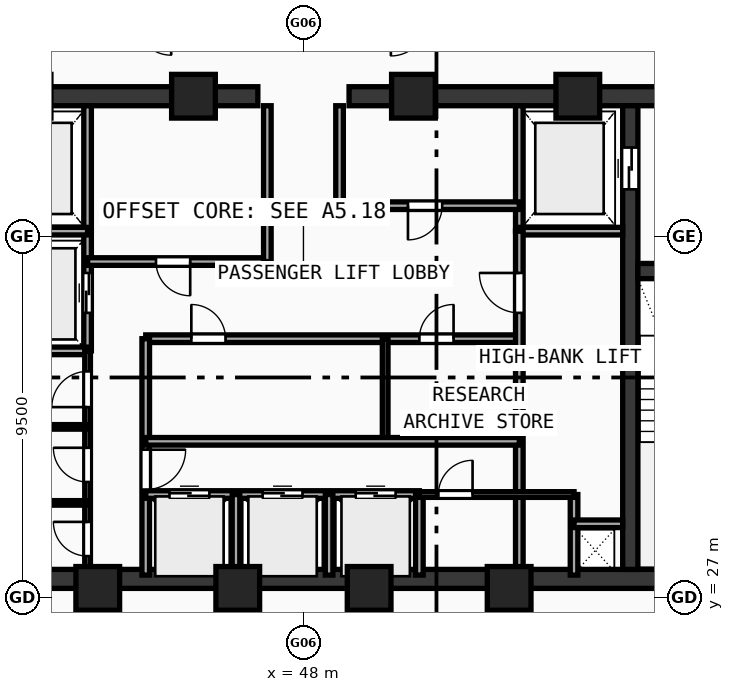
"""IFC4 building model, lengths in metres.
Left out: names, types, materials, properties, quantities, classifications, styles, units other than length and angle.
Written with IfcOpenShell. Run it as: python <this file> out.ifc"""

import sys

from ifc_helpers import new_model, si_unit, direction, frame, frame_2d, origin, origin_with_axes, origin_2d, place, context, subcontext, project, spatial, rectangle, hollow_rectangle, extrude, source, transform, mapped, element, fill, save


model = new_model("IFC4")
c1 = context("Model", 3, precision=1e-05, world=origin(), true_north=direction((0.0, 1.0)))
c2 = subcontext(c1, "Body", "Model", "MODEL_VIEW")
j1 = project(units=[si_unit("LENGTHUNIT", "METRE"), si_unit("PLANEANGLEUNIT", "RADIAN")], contexts=[c1])
p1 = place(None, origin())
s1 = spatial("IfcSite", under=j1, at=p1, CompositionType="ELEMENT")
p2 = place(p1, origin())
s2 = spatial("IfcBuilding", under=s1, at=p2, CompositionType="ELEMENT")
p3 = place(p2, frame((0.0, 0.0, 277.56)))
s3 = spatial("IfcBuildingStorey", under=s2, at=p3, CompositionType="ELEMENT", Elevation=277.56)
p4 = place(p3, frame((35.55, 27.5, 0.0), z_axis=(0.0, 0.0, 1.0), x_axis=(1.0, 0.0, 0.0)))
e1 = element("IfcWall", 1, at=p4, inside=s3, PredefinedType="SHEAR", context=c2, shape_type="SweptSolid", body=[
    extrude(rectangle(XDim=24.9, YDim=0.5, at=frame_2d((12.45, 0.0))), origin(), (0.0, 0.0, 1.0), 3.47),
])
p5 = place(p3, frame((35.55, 40.2, 0.0), z_axis=(0.0, 0.0, 1.0), x_axis=(1.0, 0.0, 0.0)))
e2 = element("IfcWall", 2, at=p5, inside=s3, PredefinedType="SHEAR", context=c2, shape_type="SweptSolid", body=[
    extrude(rectangle(XDim=11.25, YDim=0.5, at=frame_2d((5.625, 0.0))), origin(), (0.0, 0.0, 1.0), 3.47),
])
p6 = place(p5, frame((1.6, 0.0, 0.0)))
e3 = element("IfcOpeningElement", 3, at=p6, cuts=e2, PredefinedType="OPENING", context=c2, shape_type="SweptSolid", body=[
    extrude(rectangle(XDim=1.05, YDim=2.1, at=frame_2d((0.525, 1.05))), frame((0.0, 0.26, 0.0), z_axis=(0.0, -1.0, 0.0), x_axis=(1.0, 0.0, 0.0)), (0.0, 0.0, 1.0), 0.52),
])
p7 = place(p3, frame((49.2, 40.2, 0.0), z_axis=(0.0, 0.0, 1.0), x_axis=(1.0, 0.0, 0.0)))
e4 = element("IfcWall", 4, at=p7, inside=s3, PredefinedType="SHEAR", context=c2, shape_type="SweptSolid", body=[
    extrude(rectangle(XDim=11.25, YDim=0.5, at=frame_2d((5.625, 0.0))), origin(), (0.0, 0.0, 1.0), 3.47),
])
p8 = place(p7, frame((8.6, 0.0, 0.0)))
e5 = element("IfcOpeningElement", 5, at=p8, cuts=e4, PredefinedType="OPENING", context=c2, shape_type="SweptSolid", body=[
    extrude(rectangle(XDim=1.05, YDim=2.1, at=frame_2d((0.525, 1.05))), frame((0.0, 0.26, 0.0), z_axis=(0.0, -1.0, 0.0), x_axis=(1.0, 0.0, 0.0)), (0.0, 0.0, 1.0), 0.52),
])
p9 = place(p3, frame((56.6, 27.75, 0.0), z_axis=(0.0, 0.0, 1.0), x_axis=(0.0, 1.0, 0.0)))
e6 = element("IfcWall", 6, at=p9, inside=s3, PredefinedType="SHEAR", context=c2, shape_type="SweptSolid", body=[
    extrude(rectangle(XDim=12.2, YDim=0.4, at=frame_2d((6.1, 0.0))), origin(), (0.0, 0.0, 1.0), 3.47),
])
p10 = place(p9, frame((10.0, 0.0, 0.0)))
e7 = element("IfcOpeningElement", 7, at=p10, cuts=e6, PredefinedType="OPENING", context=c2, shape_type="SweptSolid", body=[
    extrude(rectangle(XDim=1.1, YDim=2.1, at=frame_2d((0.55, 1.05))), frame((0.0, 0.21, 0.0), z_axis=(0.0, -1.0, 0.0), x_axis=(1.0, 0.0, 0.0)), (0.0, 0.0, 1.0), 0.42),
])
p11 = place(p3, frame((56.8, 35.6, 0.0), z_axis=(0.0, 0.0, 1.0), x_axis=(1.0, 0.0, 0.0)))
e8 = element("IfcWall", 8, at=p11, inside=s3, PredefinedType="SHEAR", context=c2, shape_type="SweptSolid", body=[
    extrude(rectangle(XDim=3.15, YDim=0.4, at=frame_2d((1.575, 0.0))), origin(), (0.0, 0.0, 1.0), 3.47),
])
p12 = place(p11, frame((1.02, 0.0, 0.0)))
e9 = element("IfcOpeningElement", 9, at=p12, cuts=e8, PredefinedType="OPENING", context=c2, shape_type="SweptSolid", body=[
    extrude(rectangle(XDim=1.05, YDim=2.1, at=frame_2d((0.525, 1.05))), frame((0.0, 0.21, 0.0), z_axis=(0.0, -1.0, 0.0), x_axis=(1.0, 0.0, 0.0)), (0.0, 0.0, 1.0), 0.42),
])
m1 = source(origin(), c2, "Body", "SweptSolid", [
    extrude(hollow_rectangle(XDim=1.15, YDim=1.15, WallThickness=0.048, at=origin_2d()), origin(), (0.0, 0.0, 1.0), 3.73),
])
for number, where, z_axis, x_axis in (
    (10, (42.588, 27.25, -0.26), (0.0, 0.0, 1.0), (1.0, 0.0, 0.0)),
    (11, (46.272, 27.25, -0.26), (0.0, 0.0, 1.0), (1.0, 0.0, 0.0)),
    (12, (49.729, 27.25, -0.26), (0.0, 0.0, 1.0), (1.0, 0.0, 0.0)),
    (13, (53.412, 27.25, -0.26), (0.0, 0.0, 1.0), (1.0, 0.0, 0.0)),
    (14, (55.219, 40.2, -0.26), (0.0, 0.0, 1.0), (1.0, 0.0, 0.0)),
    (15, (50.894, 40.2, -0.26), (0.0, 0.0, 1.0), (1.0, 0.0, 0.0)),
    (16, (45.106, 40.2, -0.26), (0.0, 0.0, 1.0), (1.0, 0.0, 0.0)),
):
    element("IfcColumn", number, at=place(p3, frame(where, z_axis=z_axis, x_axis=x_axis)), inside=s3, PredefinedType="COLUMN", context=c2, shape_type="MappedRepresentation", body=[
        mapped(m1, transform((0.0, 0.0, 0.0), scale=1.0)),
    ])
p13 = place(p3, frame((42.32, 33.5, 0.0), z_axis=(0.0, 0.0, 1.0), x_axis=(0.0, 1.0, 0.0)))
e17 = element("IfcWall", 17, at=p13, inside=s3, PredefinedType="SOLIDWALL", context=c2, shape_type="SweptSolid", body=[
    extrude(rectangle(XDim=6.45, YDim=0.2, at=frame_2d((3.225, 0.0))), origin(), (0.0, 0.0, 1.0), 3.47),
])
p14 = place(p13, frame((1.0, 0.0, 0.0)))
e18 = element("IfcOpeningElement", 18, at=p14, cuts=e17, PredefinedType="OPENING", context=c2, shape_type="SweptSolid", body=[
    extrude(rectangle(XDim=1.05, YDim=2.1, at=frame_2d((0.525, 1.05))), frame((0.0, 0.11, 0.0), z_axis=(0.0, -1.0, 0.0), x_axis=(1.0, 0.0, 0.0)), (0.0, 0.0, 1.0), 0.22),
])
for number, where, z_axis, x_axis in (
    (19, (39.6, 36.65, 0.0), (0.0, 0.0, 1.0), (1.0, 0.0, 0.0)),
    (20, (39.6, 33.5, 0.0), (0.0, 0.0, 1.0), (1.0, 0.0, 0.0)),
):
    element("IfcWall", number, at=place(p3, frame(where, z_axis=z_axis, x_axis=x_axis)), inside=s3, PredefinedType="SOLIDWALL", context=c2, shape_type="SweptSolid", body=[
        extrude(rectangle(XDim=2.72, YDim=0.2, at=frame_2d((1.36, 0.0))), origin(), (0.0, 0.0, 1.0), 3.47),
    ])
p15 = place(p3, frame((53.68, 36.65, 0.0), z_axis=(0.0, 0.0, 1.0), x_axis=(0.0, 1.0, 0.0)))
e21 = element("IfcWall", 21, at=p15, inside=s3, PredefinedType="SOLIDWALL", context=c2, shape_type="SweptSolid", body=[
    extrude(rectangle(XDim=3.3, YDim=0.2, at=frame_2d((1.65, 0.0))), origin(), (0.0, 0.0, 1.0), 3.47),
])
p16 = place(p3, frame((53.68, 36.65, 0.0), z_axis=(0.0, 0.0, 1.0), x_axis=(1.0, 0.0, 0.0)))
e22 = element("IfcWall", 22, at=p16, inside=s3, PredefinedType="SOLIDWALL", context=c2, shape_type="SweptSolid", body=[
    extrude(rectangle(XDim=2.72, YDim=0.2, at=frame_2d((1.36, 0.0))), origin(), (0.0, 0.0, 1.0), 3.47),
])
p17 = place(p3, frame((42.32, 35.85, 0.0), z_axis=(0.0, 0.0, 1.0), x_axis=(1.0, 0.0, 0.0)))
e23 = element("IfcWall", 23, at=p17, inside=s3, PredefinedType="SOLIDWALL", context=c2, shape_type="SweptSolid", body=[
    extrude(rectangle(XDim=4.73, YDim=0.2, at=frame_2d((2.365, 0.0))), origin(), (0.0, 0.0, 1.0), 3.47),
])
p18 = place(p17, frame((1.8, 0.0, 0.0)))
e24 = element("IfcOpeningElement", 24, at=p18, cuts=e23, PredefinedType="OPENING", context=c2, shape_type="SweptSolid", body=[
    extrude(rectangle(XDim=0.9, YDim=2.1, at=frame_2d((0.45, 1.05))), frame((0.0, 0.11, 0.0), z_axis=(0.0, -1.0, 0.0), x_axis=(1.0, 0.0, 0.0)), (0.0, 0.0, 1.0), 0.22),
])
p19 = place(p3, frame((48.95, 37.32, 0.0), z_axis=(0.0, 0.0, 1.0), x_axis=(1.0, 0.0, 0.0)))
e25 = element("IfcWall", 25, at=p19, inside=s3, PredefinedType="SOLIDWALL", context=c2, shape_type="SweptSolid", body=[
    extrude(rectangle(XDim=4.73, YDim=0.2, at=frame_2d((2.365, 0.0))), origin(), (0.0, 0.0, 1.0), 3.47),
])
p20 = place(p19, frame((1.8, 0.0, 0.0)))
e26 = element("IfcOpeningElement", 26, at=p20, cuts=e25, PredefinedType="OPENING", context=c2, shape_type="SweptSolid", body=[
    extrude(rectangle(XDim=0.9, YDim=2.1, at=frame_2d((0.45, 1.05))), frame((0.0, 0.11, 0.0), z_axis=(0.0, -1.0, 0.0), x_axis=(1.0, 0.0, 0.0)), (0.0, 0.0, 1.0), 0.22),
])
p21 = place(p3, frame((47.05, 35.85, 0.0), z_axis=(0.0, 0.0, 1.0), x_axis=(0.0, 1.0, 0.0)))
e27 = element("IfcWall", 27, at=p21, inside=s3, PredefinedType="SOLIDWALL", context=c2, shape_type="SweptSolid", body=[
    extrude(rectangle(XDim=4.1, YDim=0.2, at=frame_2d((2.05, 0.0))), origin(), (0.0, 0.0, 1.0), 3.47),
])
p22 = place(p3, frame((48.95, 37.32, 0.0), z_axis=(0.0, 0.0, 1.0), x_axis=(0.0, 1.0, 0.0)))
e28 = element("IfcWall", 28, at=p22, inside=s3, PredefinedType="SOLIDWALL", context=c2, shape_type="SweptSolid", body=[
    extrude(rectangle(XDim=2.63, YDim=0.2, at=frame_2d((1.315, 0.0))), origin(), (0.0, 0.0, 1.0), 3.47),
])
p23 = place(p3, frame((43.85, 33.82, 0.0), z_axis=(0.0, 0.0, 1.0), x_axis=(1.0, 0.0, 0.0)))
e29 = element("IfcWall", 29, at=p23, inside=s3, PredefinedType="SOLIDWALL", context=c2, shape_type="SweptSolid", body=[
    extrude(rectangle(XDim=9.83, YDim=0.2, at=frame_2d((4.915, 0.0))), origin(), (0.0, 0.0, 1.0), 3.47),
])
p24 = place(p23, frame((1.2, 0.0, 0.0)))
e30 = element("IfcOpeningElement", 30, at=p24, cuts=e29, PredefinedType="OPENING", context=c2, shape_type="SweptSolid", body=[
    extrude(rectangle(XDim=0.9, YDim=2.1, at=frame_2d((0.45, 1.05))), frame((0.0, 0.11, 0.0), z_axis=(0.0, -1.0, 0.0), x_axis=(1.0, 0.0, 0.0)), (0.0, 0.0, 1.0), 0.22),
])
p25 = place(p23, frame((7.2, 0.0, 0.0)))
e31 = element("IfcOpeningElement", 31, at=p25, cuts=e29, PredefinedType="OPENING", context=c2, shape_type="SweptSolid", body=[
    extrude(rectangle(XDim=0.9, YDim=2.1, at=frame_2d((0.45, 1.05))), frame((0.0, 0.11, 0.0), z_axis=(0.0, -1.0, 0.0), x_axis=(1.0, 0.0, 0.0)), (0.0, 0.0, 1.0), 0.22),
])
p26 = place(p3, frame((43.85, 27.6, 0.0), z_axis=(0.0, 0.0, 1.0), x_axis=(0.0, 1.0, 0.0)))
e32 = element("IfcWall", 32, at=p26, inside=s3, PredefinedType="SOLIDWALL", context=c2, shape_type="SweptSolid", body=[
    extrude(rectangle(XDim=6.22, YDim=0.2, at=frame_2d((3.11, 0.0))), origin(), (0.0, 0.0, 1.0), 3.47),
])
p27 = place(p26, frame((2.25, 0.0, 0.0)))
e33 = element("IfcOpeningElement", 33, at=p27, cuts=e32, PredefinedType="OPENING", context=c2, shape_type="SweptSolid", body=[
    extrude(rectangle(XDim=1.05, YDim=2.1, at=frame_2d((0.525, 1.05))), frame((0.0, 0.11, 0.0), z_axis=(0.0, -1.0, 0.0), x_axis=(1.0, 0.0, 0.0)), (0.0, 0.0, 1.0), 0.22),
])
p28 = place(p3, frame((53.68, 27.6, 0.0), z_axis=(0.0, 0.0, 1.0), x_axis=(0.0, 1.0, 0.0)))
e34 = element("IfcWall", 34, at=p28, inside=s3, PredefinedType="SOLIDWALL", context=c2, shape_type="SweptSolid", body=[
    extrude(rectangle(XDim=9.05, YDim=0.2, at=frame_2d((4.525, 0.0))), origin(), (0.0, 0.0, 1.0), 3.47),
])
p29 = place(p28, frame((6.9, 0.0, 0.0)))
e35 = element("IfcOpeningElement", 35, at=p29, cuts=e34, PredefinedType="OPENING", context=c2, shape_type="SweptSolid", body=[
    extrude(rectangle(XDim=1.05, YDim=2.1, at=frame_2d((0.525, 1.05))), frame((0.0, 0.11, 0.0), z_axis=(0.0, -1.0, 0.0), x_axis=(1.0, 0.0, 0.0)), (0.0, 0.0, 1.0), 0.22),
])
p30 = place(p3, frame((50.15, 31.12, 0.0), z_axis=(0.0, 0.0, 1.0), x_axis=(0.0, 1.0, 0.0)))
e36 = element("IfcWall", 36, at=p30, inside=s3, PredefinedType="PARTITIONING", context=c2, shape_type="SweptSolid", body=[
    extrude(rectangle(XDim=2.7, YDim=0.15, at=frame_2d((1.35, 0.0))), origin(), (0.0, 0.0, 1.0), 3.47),
])
p31 = place(p3, frame((43.85, 29.72, 0.0), z_axis=(0.0, 0.0, 1.0), x_axis=(1.0, 0.0, 0.0)))
e37 = element("IfcWall", 37, at=p31, inside=s3, PredefinedType="SOLIDWALL", context=c2, shape_type="SweptSolid", body=[
    extrude(rectangle(XDim=7.2, YDim=0.2, at=frame_2d((3.6, 0.0))), origin(), (0.0, 0.0, 1.0), 3.47),
])
p32 = place(p31, frame((0.625, 0.0, 0.0)))
e38 = element("IfcOpeningElement", 38, at=p32, cuts=e37, PredefinedType="OPENING", context=c2, shape_type="SweptSolid", body=[
    extrude(rectangle(XDim=1.05, YDim=2.1, at=frame_2d((0.525, 1.05))), frame((0.0, 0.11, 0.0), z_axis=(0.0, -1.0, 0.0), x_axis=(1.0, 0.0, 0.0)), (0.0, 0.0, 1.0), 0.22),
])
p33 = place(p31, frame((3.075, 0.0, 0.0)))
e39 = element("IfcOpeningElement", 39, at=p33, cuts=e37, PredefinedType="OPENING", context=c2, shape_type="SweptSolid", body=[
    extrude(rectangle(XDim=1.05, YDim=2.1, at=frame_2d((0.525, 1.05))), frame((0.0, 0.11, 0.0), z_axis=(0.0, -1.0, 0.0), x_axis=(1.0, 0.0, 0.0)), (0.0, 0.0, 1.0), 0.22),
])
p34 = place(p31, frame((5.525, 0.0, 0.0)))
e40 = element("IfcOpeningElement", 40, at=p34, cuts=e37, PredefinedType="OPENING", context=c2, shape_type="SweptSolid", body=[
    extrude(rectangle(XDim=1.05, YDim=2.1, at=frame_2d((0.525, 1.05))), frame((0.0, 0.11, 0.0), z_axis=(0.0, -1.0, 0.0), x_axis=(1.0, 0.0, 0.0)), (0.0, 0.0, 1.0), 0.22),
])
p35 = place(p3, frame((51.05, 27.6, 0.0), z_axis=(0.0, 0.0, 1.0), x_axis=(0.0, 1.0, 0.0)))
e41 = element("IfcWall", 41, at=p35, inside=s3, PredefinedType="SOLIDWALL", context=c2, shape_type="SweptSolid", body=[
    extrude(rectangle(XDim=2.12, YDim=0.2, at=frame_2d((1.06, 0.0))), origin(), (0.0, 0.0, 1.0), 3.47),
])
p36 = place(p3, frame((43.85, 31.12, 0.0), z_axis=(0.0, 0.0, 1.0), x_axis=(1.0, 0.0, 0.0)))
e42 = element("IfcWall", 42, at=p36, inside=s3, PredefinedType="SOLIDWALL", context=c2, shape_type="SweptSolid", body=[
    extrude(rectangle(XDim=9.83, YDim=0.2, at=frame_2d((4.915, 0.0))), origin(), (0.0, 0.0, 1.0), 3.47),
])
for number, where, z_axis, x_axis in (
    (43, (46.225, 27.6, 0.0), (0.0, 0.0, 1.0), (0.0, 1.0, 0.0)),
    (44, (48.675, 27.6, 0.0), (0.0, 0.0, 1.0), (0.0, 1.0, 0.0)),
    (45, (55.12, 27.6, 0.0), (0.0, 0.0, 1.0), (0.0, 1.0, 0.0)),
):
    element("IfcWall", number, at=place(p3, frame(where, z_axis=z_axis, x_axis=x_axis)), inside=s3, PredefinedType="SOLIDWALL", context=c2, shape_type="SweptSolid", body=[
        extrude(rectangle(XDim=2.12, YDim=0.2, at=frame_2d((1.06, 0.0))), origin(), (0.0, 0.0, 1.0), 3.47),
    ])
p37 = place(p3, frame((55.12, 28.95, 0.0), z_axis=(0.0, 0.0, 1.0), x_axis=(1.0, 0.0, 0.0)))
e46 = element("IfcWall", 46, at=p37, inside=s3, PredefinedType="SOLIDWALL", context=c2, shape_type="SweptSolid", body=[
    extrude(rectangle(XDim=1.28, YDim=0.2, at=frame_2d((0.64, 0.0))), origin(), (0.0, 0.0, 1.0), 3.47),
])
p38 = place(p3, frame((42.32, 27.6, 0.0), z_axis=(0.0, 0.0, 1.0), x_axis=(0.0, 1.0, 0.0)))
e47 = element("IfcWall", 47, at=p38, inside=s3, PredefinedType="PARTITIONING", context=c2, shape_type="SweptSolid", body=[
    extrude(rectangle(XDim=5.9, YDim=0.15, at=frame_2d((2.95, 0.0))), origin(), (0.0, 0.0, 1.0), 3.47),
])
p39 = place(p38, frame((0.5, 0.0, 0.0)))
e48 = element("IfcOpeningElement", 48, at=p39, cuts=e47, PredefinedType="OPENING", context=c2, shape_type="SweptSolid", body=[
    extrude(rectangle(XDim=0.9, YDim=2.1, at=frame_2d((0.45, 1.05))), frame((0.0, 0.085, 0.0), z_axis=(0.0, -1.0, 0.0), x_axis=(1.0, 0.0, 0.0)), (0.0, 0.0, 1.0), 0.17),
])
p40 = place(p38, frame((2.45, 0.0, 0.0)))
e49 = element("IfcOpeningElement", 49, at=p40, cuts=e47, PredefinedType="OPENING", context=c2, shape_type="SweptSolid", body=[
    extrude(rectangle(XDim=0.9, YDim=2.1, at=frame_2d((0.45, 1.05))), frame((0.0, 0.085, 0.0), z_axis=(0.0, -1.0, 0.0), x_axis=(1.0, 0.0, 0.0)), (0.0, 0.0, 1.0), 0.17),
])
p41 = place(p38, frame((4.42, 0.0, 0.0)))
e50 = element("IfcOpeningElement", 50, at=p41, cuts=e47, PredefinedType="OPENING", context=c2, shape_type="SweptSolid", body=[
    extrude(rectangle(XDim=0.94, YDim=2.1, at=frame_2d((0.47, 1.05))), frame((0.0, 0.085, 0.0), z_axis=(0.0, -1.0, 0.0), x_axis=(1.0, 0.0, 0.0)), (0.0, 0.0, 1.0), 0.17),
])
p42 = place(p3, frame((51.05, 29.72, 0.0), z_axis=(0.0, 0.0, 1.0), x_axis=(1.0, 0.0, 0.0)))
e51 = element("IfcWall", 51, at=p42, inside=s3, PredefinedType="PARTITIONING", context=c2, shape_type="SweptSolid", body=[
    extrude(rectangle(XDim=4.07, YDim=0.15, at=frame_2d((2.035, 0.0))), origin(), (0.0, 0.0, 1.0), 3.47),
])
p43 = place(p42, frame((0.5, 0.0, 0.0)))
e52 = element("IfcOpeningElement", 52, at=p43, cuts=e51, PredefinedType="OPENING", context=c2, shape_type="SweptSolid", body=[
    extrude(rectangle(XDim=0.9, YDim=2.1, at=frame_2d((0.45, 1.05))), frame((0.0, 0.085, 0.0), z_axis=(0.0, -1.0, 0.0), x_axis=(1.0, 0.0, 0.0)), (0.0, 0.0, 1.0), 0.17),
])
for number, where, z_axis, x_axis in (
    (53, (39.6, 29.5, 0.0), (0.0, 0.0, 1.0), (1.0, 0.0, 0.0)),
    (54, (39.6, 31.5, 0.0), (0.0, 0.0, 1.0), (1.0, 0.0, 0.0)),
):
    element("IfcWall", number, at=place(p3, frame(where, z_axis=z_axis, x_axis=x_axis)), inside=s3, PredefinedType="PARTITIONING", context=c2, shape_type="SweptSolid", body=[
        extrude(rectangle(XDim=2.72, YDim=0.12, at=frame_2d((1.36, 0.0))), origin(), (0.0, 0.0, 1.0), 3.47),
    ])
m2 = source(origin(), c2, "Body", "SweptSolid", [
    extrude(rectangle(XDim=1.1, YDim=2.1, at=frame_2d((0.55, 1.05))), frame((0.0, 0.025, 0.0), z_axis=(0.0, -1.0, 0.0), x_axis=(1.0, 0.0, 0.0)), (0.0, 0.0, 1.0), 0.05),
])
p44 = place(p10, origin_with_axes())
e55 = element("IfcDoor", 55, at=p44, inside=s3, OperationType="DOUBLE_DOOR_SLIDING", PredefinedType="DOOR", context=c2, shape_type="MappedRepresentation", body=[
    mapped(m2, transform((0.0, 0.0, 0.0), scale=1.0)),
])
fill(e7, e55)
m3 = source(origin(), c2, "Body", "SweptSolid", [
    extrude(rectangle(XDim=1.05, YDim=2.1, at=frame_2d((0.525, 1.05))), frame((0.0, 0.025, 0.0), z_axis=(0.0, -1.0, 0.0), x_axis=(1.0, 0.0, 0.0)), (0.0, 0.0, 1.0), 0.05),
])
p45 = place(p14, origin_with_axes())
e56 = element("IfcDoor", 56, at=p45, inside=s3, OperationType="DOUBLE_DOOR_SLIDING", PredefinedType="DOOR", context=c2, shape_type="MappedRepresentation", body=[
    mapped(m3, transform((0.0, 0.0, 0.0), scale=1.0)),
])
fill(e18, e56)
m4 = source(origin(), c2, "Body", "SweptSolid", [
    extrude(rectangle(XDim=0.9, YDim=2.1, at=frame_2d((0.45, 1.05))), frame((0.0, 0.025, 0.0), z_axis=(0.0, -1.0, 0.0), x_axis=(1.0, 0.0, 0.0)), (0.0, 0.0, 1.0), 0.05),
])
p46 = place(p18, frame((0.9, 0.0, 0.0), z_axis=(0.0, 0.0, 1.0), x_axis=(-1.0, 0.0, 0.0)))
e57 = element("IfcDoor", 57, at=p46, inside=s3, OperationType="SINGLE_SWING_LEFT", PredefinedType="DOOR", context=c2, shape_type="MappedRepresentation", body=[
    mapped(m4, transform((0.0, 0.0, 0.0), scale=1.0)),
])
fill(e24, e57)
p47 = place(p20, frame((0.9, 0.0, 0.0), z_axis=(0.0, 0.0, 1.0), x_axis=(-1.0, 0.0, 0.0)))
e58 = element("IfcDoor", 58, at=p47, inside=s3, OperationType="SINGLE_SWING_RIGHT", PredefinedType="DOOR", context=c2, shape_type="MappedRepresentation", body=[
    mapped(m4, transform((0.0, 0.0, 0.0), scale=1.0)),
])
fill(e26, e58)
p48 = place(p24, origin_with_axes())
e59 = element("IfcDoor", 59, at=p48, inside=s3, OperationType="SINGLE_SWING_LEFT", PredefinedType="DOOR", context=c2, shape_type="MappedRepresentation", body=[
    mapped(m4, transform((0.0, 0.0, 0.0), scale=1.0)),
])
fill(e30, e59)
p49 = place(p25, origin_with_axes())
e60 = element("IfcDoor", 60, at=p49, inside=s3, OperationType="SINGLE_SWING_RIGHT", PredefinedType="DOOR", context=c2, shape_type="MappedRepresentation", body=[
    mapped(m4, transform((0.0, 0.0, 0.0), scale=1.0)),
])
fill(e31, e60)
p50 = place(p27, frame((1.05, 0.0, 0.0), z_axis=(0.0, 0.0, 1.0), x_axis=(-1.0, 0.0, 0.0)))
e61 = element("IfcDoor", 61, at=p50, inside=s3, OperationType="SINGLE_SWING_LEFT", PredefinedType="DOOR", context=c2, shape_type="MappedRepresentation", body=[
    mapped(m3, transform((0.0, 0.0, 0.0), scale=1.0)),
])
fill(e33, e61)
p51 = place(p29, origin_with_axes())
e62 = element("IfcDoor", 62, at=p51, inside=s3, OperationType="SINGLE_SWING_RIGHT", PredefinedType="DOOR", context=c2, shape_type="MappedRepresentation", body=[
    mapped(m3, transform((0.0, 0.0, 0.0), scale=1.0)),
])
fill(e35, e62)
p52 = place(p32, origin_with_axes())
e63 = element("IfcDoor", 63, at=p52, inside=s3, OperationType="DOUBLE_DOOR_SLIDING", PredefinedType="DOOR", context=c2, shape_type="MappedRepresentation", body=[
    mapped(m3, transform((0.0, 0.0, 0.0), scale=1.0)),
])
fill(e38, e63)
p53 = place(p33, origin_with_axes())
e64 = element("IfcDoor", 64, at=p53, inside=s3, OperationType="DOUBLE_DOOR_SLIDING", PredefinedType="DOOR", context=c2, shape_type="MappedRepresentation", body=[
    mapped(m3, transform((0.0, 0.0, 0.0), scale=1.0)),
])
fill(e39, e64)
p54 = place(p34, origin_with_axes())
e65 = element("IfcDoor", 65, at=p54, inside=s3, OperationType="DOUBLE_DOOR_SLIDING", PredefinedType="DOOR", context=c2, shape_type="MappedRepresentation", body=[
    mapped(m3, transform((0.0, 0.0, 0.0), scale=1.0)),
])
fill(e40, e65)
p55 = place(p39, origin_with_axes())
e66 = element("IfcDoor", 66, at=p55, inside=s3, OperationType="SINGLE_SWING_RIGHT", PredefinedType="DOOR", context=c2, shape_type="MappedRepresentation", body=[
    mapped(m4, transform((0.0, 0.0, 0.0), scale=1.0)),
])
fill(e48, e66)
p56 = place(p40, origin_with_axes())
e67 = element("IfcDoor", 67, at=p56, inside=s3, OperationType="SINGLE_SWING_RIGHT", PredefinedType="DOOR", context=c2, shape_type="MappedRepresentation", body=[
    mapped(m4, transform((0.0, 0.0, 0.0), scale=1.0)),
])
fill(e49, e67)
m5 = source(origin(), c2, "Body", "SweptSolid", [
    extrude(rectangle(XDim=0.94, YDim=2.1, at=frame_2d((0.47, 1.05))), frame((0.0, 0.025, 0.0), z_axis=(0.0, -1.0, 0.0), x_axis=(1.0, 0.0, 0.0)), (0.0, 0.0, 1.0), 0.05),
])
p57 = place(p41, origin_with_axes())
e68 = element("IfcDoor", 68, at=p57, inside=s3, OperationType="SINGLE_SWING_LEFT", PredefinedType="DOOR", context=c2, shape_type="MappedRepresentation", body=[
    mapped(m5, transform((0.0, 0.0, 0.0), scale=1.0)),
])
fill(e50, e68)
p58 = place(p43, origin_with_axes())
e69 = element("IfcDoor", 69, at=p58, inside=s3, OperationType="SINGLE_SWING_RIGHT", PredefinedType="DOOR", context=c2, shape_type="MappedRepresentation", body=[
    mapped(m4, transform((0.0, 0.0, 0.0), scale=1.0)),
])
fill(e52, e69)
save(model, sys.argv[1])
